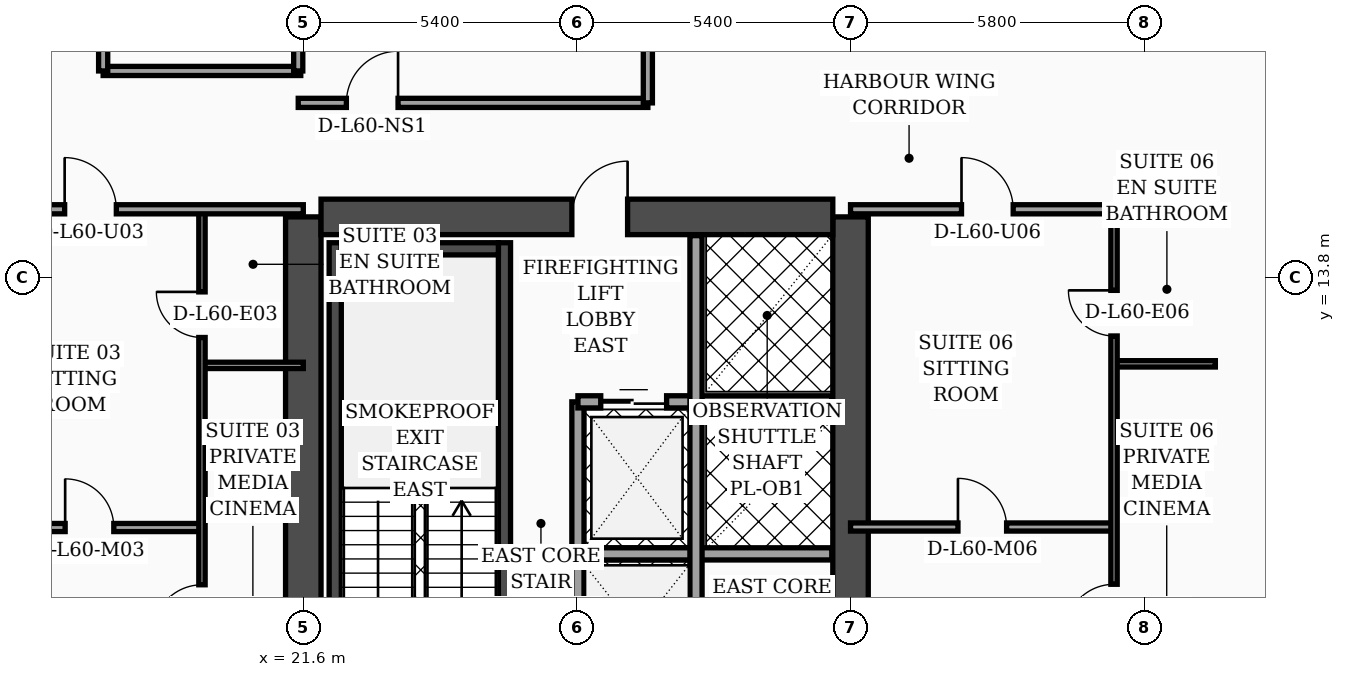
"""IFC4 building model, lengths in metres.
Left out: names, types, materials, properties, quantities, classifications, styles, units other than length and angle.
Written with IfcOpenShell. Run it as: python <this file> out.ifc"""

import sys

from ifc_helpers import new_model, si_unit, direction, frame, frame_2d, origin, place, context, subcontext, project, spatial, rectangle, extrude, element, fill, save


model = new_model("IFC4")
c1 = context("Model", 3, precision=1e-05, world=origin(), true_north=direction((0.0, 1.0)))
c2 = subcontext(c1, "Body", "Model", "MODEL_VIEW")
j1 = project(units=[si_unit("LENGTHUNIT", "METRE"), si_unit("PLANEANGLEUNIT", "RADIAN")], contexts=[c1])
p1 = place(None, origin())
s1 = spatial("IfcSite", under=j1, at=p1, CompositionType="ELEMENT")
p2 = place(p1, origin())
s2 = spatial("IfcBuilding", under=s1, at=p2, CompositionType="ELEMENT")
p3 = place(p2, frame((0.0, 0.0, 243.8)))
s3 = spatial("IfcBuildingStorey", under=s2, at=p3, CompositionType="ELEMENT", Elevation=243.8)
for number, where, z_axis, x_axis in (
    (1, (21.6, 4.6, 0.0), (0.0, 0.0, 1.0), (0.0, 1.0, 0.0)),
    (2, (32.4, 4.6, 0.0), (0.0, 0.0, 1.0), (0.0, 1.0, 0.0)),
):
    element("IfcWall", number, at=place(p3, frame(where, z_axis=z_axis, x_axis=x_axis)), inside=s3, PredefinedType="SHEAR", context=c2, shape_type="SweptSolid", body=[
        extrude(rectangle(XDim=10.4, YDim=0.7, at=frame_2d((5.2, 0.0))), origin(), (0.0, 0.0, 1.0), 3.56),
    ])
p4 = place(p3, frame((21.95, 15.0, 0.0), z_axis=(0.0, 0.0, 1.0), x_axis=(1.0, 0.0, 0.0)))
e3 = element("IfcWall", 3, at=p4, inside=s3, PredefinedType="SHEAR", context=c2, shape_type="SweptSolid", body=[
    extrude(rectangle(XDim=10.1, YDim=0.7, at=frame_2d((5.05, 0.0))), origin(), (0.0, 0.0, 1.0), 3.56),
])
p5 = place(p4, frame((4.95, 0.0, 0.0)))
e4 = element("IfcOpeningElement", 4, at=p5, cuts=e3, PredefinedType="OPENING", context=c2, shape_type="SweptSolid", body=[
    extrude(rectangle(XDim=1.1, YDim=2.2, at=frame_2d((0.55, 1.1))), frame((0.0, 0.36, 0.0), z_axis=(0.0, -1.0, 0.0), x_axis=(1.0, 0.0, 0.0)), (0.0, 0.0, 1.0), 0.72),
])
p6 = place(p3, frame((22.23, 4.95, 0.0), z_axis=(0.0, 0.0, 1.0), x_axis=(0.0, 1.0, 0.0)))
e5 = element("IfcWall", 5, at=p6, inside=s3, PredefinedType="SOLIDWALL", context=c2, shape_type="SweptSolid", body=[
    extrude(rectangle(XDim=9.54, YDim=0.24, at=frame_2d((4.77, 0.0))), origin(), (0.0, 0.0, 1.0), 3.56),
])
p7 = place(p3, frame((25.57, 4.95, 0.0), z_axis=(0.0, 0.0, 1.0), x_axis=(0.0, 1.0, 0.0)))
e6 = element("IfcWall", 6, at=p7, inside=s3, PredefinedType="SOLIDWALL", context=c2, shape_type="SweptSolid", body=[
    extrude(rectangle(XDim=9.54, YDim=0.24, at=frame_2d((4.77, 0.0))), origin(), (0.0, 0.0, 1.0), 3.56),
])
p8 = place(p7, frame((0.35, 0.0, 0.0)))
e7 = element("IfcOpeningElement", 7, at=p8, cuts=e6, PredefinedType="OPENING", context=c2, shape_type="SweptSolid", body=[
    extrude(rectangle(XDim=1.15, YDim=2.2, at=frame_2d((0.575, 1.1))), frame((0.0, 0.13, 0.0), z_axis=(0.0, -1.0, 0.0), x_axis=(1.0, 0.0, 0.0)), (0.0, 0.0, 1.0), 0.26),
])
p9 = place(p3, frame((22.35, 14.37, 0.0), z_axis=(0.0, 0.0, 1.0), x_axis=(1.0, 0.0, 0.0)))
e8 = element("IfcWall", 8, at=p9, inside=s3, PredefinedType="SOLIDWALL", context=c2, shape_type="SweptSolid", body=[
    extrude(rectangle(XDim=3.1, YDim=0.24, at=frame_2d((1.55, 0.0))), origin(), (0.0, 0.0, 1.0), 3.56),
])
p10 = place(p3, frame((46.63, 5.505, 0.0), z_axis=(0.0, 0.0, 1.0), x_axis=(-0.300501856448, 0.953781229775, 0.0)))
e9 = element("IfcWall", 9, at=p10, inside=s3, PredefinedType="SOLIDWALL", context=c2, shape_type="SweptSolid", body=[
    extrude(rectangle(XDim=30.814, YDim=0.32, at=frame_2d((15.407, 0.0))), origin(), (0.0, 0.0, 1.0), 3.56),
])
p11 = place(p10, frame((8.9, 0.0, 0.0)))
e10 = element("IfcOpeningElement", 10, at=p11, cuts=e9, PredefinedType="OPENING", context=c2, shape_type="SweptSolid", body=[
    extrude(rectangle(XDim=1.4, YDim=2.25, at=frame_2d((0.7, 1.125))), frame((0.0, 0.17, 0.0), z_axis=(0.0, -1.0, 0.0), x_axis=(1.0, 0.0, 0.0)), (0.0, 0.0, 1.0), 0.34),
])
p12 = place(p10, frame((4.437, 0.0, 0.7)))
e11 = element("IfcOpeningElement", 11, at=p12, cuts=e9, PredefinedType="OPENING", context=c2, shape_type="SweptSolid", body=[
    extrude(rectangle(XDim=1.6, YDim=1.65, at=frame_2d((0.8, 0.825))), frame((0.0, 0.17, 0.0), z_axis=(0.0, -1.0, 0.0), x_axis=(1.0, 0.0, 0.0)), (0.0, 0.0, 1.0), 0.34),
])
p13 = place(p10, frame((18.696, 0.0, 0.7)))
e12 = element("IfcOpeningElement", 12, at=p13, cuts=e9, PredefinedType="OPENING", context=c2, shape_type="SweptSolid", body=[
    extrude(rectangle(XDim=1.6, YDim=1.65, at=frame_2d((0.8, 0.825))), frame((0.0, 0.17, 0.0), z_axis=(0.0, -1.0, 0.0), x_axis=(1.0, 0.0, 0.0)), (0.0, 0.0, 1.0), 0.34),
])
p14 = place(p10, frame((1.6, 0.0, 0.75)))
e13 = element("IfcOpeningElement", 13, at=p14, cuts=e9, PredefinedType="OPENING", context=c2, shape_type="SweptSolid", body=[
    extrude(rectangle(XDim=1.5, YDim=1.6, at=frame_2d((0.75, 0.8))), frame((0.0, 0.17, 0.0), z_axis=(0.0, -1.0, 0.0), x_axis=(1.0, 0.0, 0.0)), (0.0, 0.0, 1.0), 0.34),
])
p15 = place(p10, frame((6.75, 0.0, 0.75)))
e14 = element("IfcOpeningElement", 14, at=p15, cuts=e9, PredefinedType="OPENING", context=c2, shape_type="SweptSolid", body=[
    extrude(rectangle(XDim=1.5, YDim=1.6, at=frame_2d((0.75, 0.8))), frame((0.0, 0.17, 0.0), z_axis=(0.0, -1.0, 0.0), x_axis=(1.0, 0.0, 0.0)), (0.0, 0.0, 1.0), 0.34),
])
p16 = place(p10, frame((10.9, 0.0, 0.75)))
e15 = element("IfcOpeningElement", 15, at=p16, cuts=e9, PredefinedType="OPENING", context=c2, shape_type="SweptSolid", body=[
    extrude(rectangle(XDim=1.5, YDim=1.6, at=frame_2d((0.75, 0.8))), frame((0.0, 0.17, 0.0), z_axis=(0.0, -1.0, 0.0), x_axis=(1.0, 0.0, 0.0)), (0.0, 0.0, 1.0), 0.34),
])
p17 = place(p10, frame((14.0, 0.0, 0.75)))
e16 = element("IfcOpeningElement", 16, at=p17, cuts=e9, PredefinedType="OPENING", context=c2, shape_type="SweptSolid", body=[
    extrude(rectangle(XDim=1.5, YDim=1.6, at=frame_2d((0.75, 0.8))), frame((0.0, 0.17, 0.0), z_axis=(0.0, -1.0, 0.0), x_axis=(1.0, 0.0, 0.0)), (0.0, 0.0, 1.0), 0.34),
])
p18 = place(p10, frame((16.55, 0.0, 0.75)))
e17 = element("IfcOpeningElement", 17, at=p18, cuts=e9, PredefinedType="OPENING", context=c2, shape_type="SweptSolid", body=[
    extrude(rectangle(XDim=1.5, YDim=1.6, at=frame_2d((0.75, 0.8))), frame((0.0, 0.17, 0.0), z_axis=(0.0, -1.0, 0.0), x_axis=(1.0, 0.0, 0.0)), (0.0, 0.0, 1.0), 0.34),
])
p19 = place(p10, frame((20.75, 0.0, 0.75)))
e18 = element("IfcOpeningElement", 18, at=p19, cuts=e9, PredefinedType="OPENING", context=c2, shape_type="SweptSolid", body=[
    extrude(rectangle(XDim=1.5, YDim=1.6, at=frame_2d((0.75, 0.8))), frame((0.0, 0.17, 0.0), z_axis=(0.0, -1.0, 0.0), x_axis=(1.0, 0.0, 0.0)), (0.0, 0.0, 1.0), 0.34),
])
p20 = place(p10, frame((23.3, 0.0, 0.75)))
e19 = element("IfcOpeningElement", 19, at=p20, cuts=e9, PredefinedType="OPENING", context=c2, shape_type="SweptSolid", body=[
    extrude(rectangle(XDim=1.5, YDim=1.6, at=frame_2d((0.75, 0.8))), frame((0.0, 0.17, 0.0), z_axis=(0.0, -1.0, 0.0), x_axis=(1.0, 0.0, 0.0)), (0.0, 0.0, 1.0), 0.34),
])
p21 = place(p10, frame((26.4, 0.0, 0.75)))
e20 = element("IfcOpeningElement", 20, at=p21, cuts=e9, PredefinedType="OPENING", context=c2, shape_type="SweptSolid", body=[
    extrude(rectangle(XDim=1.5, YDim=1.6, at=frame_2d((0.75, 0.8))), frame((0.0, 0.17, 0.0), z_axis=(0.0, -1.0, 0.0), x_axis=(1.0, 0.0, 0.0)), (0.0, 0.0, 1.0), 0.34),
])
p22 = place(p3, frame((27.02, 4.97, 0.0), z_axis=(0.0, 0.0, 1.0), x_axis=(0.0, 1.0, 0.0)))
e21 = element("IfcWall", 21, at=p22, inside=s3, PredefinedType="SOLIDWALL", context=c2, shape_type="SweptSolid", body=[
    extrude(rectangle(XDim=6.38, YDim=0.24, at=frame_2d((3.19, 0.0))), origin(), (0.0, 0.0, 1.0), 3.56),
])
p23 = place(p3, frame((27.02, 11.35, 0.0), z_axis=(0.0, 0.0, 1.0), x_axis=(1.0, 0.0, 0.0)))
e22 = element("IfcWall", 22, at=p23, inside=s3, PredefinedType="SOLIDWALL", context=c2, shape_type="SweptSolid", body=[
    extrude(rectangle(XDim=5.01, YDim=0.24, at=frame_2d((2.505, 0.0))), origin(), (0.0, 0.0, 1.0), 3.56),
])
p24 = place(p23, frame((0.45, 0.0, 0.0)))
e23 = element("IfcOpeningElement", 23, at=p24, cuts=e22, PredefinedType="OPENING", context=c2, shape_type="SweptSolid", body=[
    extrude(rectangle(XDim=1.3, YDim=2.35, at=frame_2d((0.65, 1.175))), frame((0.0, 0.13, 0.0), z_axis=(0.0, -1.0, 0.0), x_axis=(1.0, 0.0, 0.0)), (0.0, 0.0, 1.0), 0.26),
])
p25 = place(p3, frame((27.02, 8.35, 0.0), z_axis=(0.0, 0.0, 1.0), x_axis=(1.0, 0.0, 0.0)))
e24 = element("IfcWall", 24, at=p25, inside=s3, PredefinedType="SOLIDWALL", context=c2, shape_type="SweptSolid", body=[
    extrude(rectangle(XDim=5.01, YDim=0.24, at=frame_2d((2.505, 0.0))), origin(), (0.0, 0.0, 1.0), 3.56),
])
p26 = place(p3, frame((29.35, 4.97, 0.0), z_axis=(0.0, 0.0, 1.0), x_axis=(0.0, 1.0, 0.0)))
e25 = element("IfcWall", 25, at=p26, inside=s3, PredefinedType="SOLIDWALL", context=c2, shape_type="SweptSolid", body=[
    extrude(rectangle(XDim=9.66, YDim=0.24, at=frame_2d((4.83, 0.0))), origin(), (0.0, 0.0, 1.0), 3.56),
])
p27 = place(p26, frame((0.55, 0.0, 0.0)))
e26 = element("IfcOpeningElement", 26, at=p27, cuts=e25, PredefinedType="OPENING", context=c2, shape_type="SweptSolid", body=[
    extrude(rectangle(XDim=1.3, YDim=2.35, at=frame_2d((0.65, 1.175))), frame((0.0, 0.13, 0.0), z_axis=(0.0, -1.0, 0.0), x_axis=(1.0, 0.0, 0.0)), (0.0, 0.0, 1.0), 0.26),
])
p28 = place(p3, frame((19.6, 12.07, 0.0), z_axis=(0.0, 0.0, 1.0), x_axis=(1.0, 0.0, 0.0)))
e27 = element("IfcWall", 27, at=p28, inside=s3, PredefinedType="PARTITIONING", context=c2, shape_type="SweptSolid", body=[
    extrude(rectangle(XDim=2.0, YDim=0.125, at=frame_2d((1.0, 0.0))), origin(), (0.0, 0.0, 1.0), 3.56),
])
p29 = place(p3, frame((15.15, 8.87, 0.0), z_axis=(0.0, 0.0, 1.0), x_axis=(1.0, 0.0, 0.0)))
e28 = element("IfcWall", 28, at=p29, inside=s3, PredefinedType="PARTITIONING", context=c2, shape_type="SweptSolid", body=[
    extrude(rectangle(XDim=4.45, YDim=0.16, at=frame_2d((2.225, 0.0))), origin(), (0.0, 0.0, 1.0), 3.56),
])
p30 = place(p29, frame((1.75, 0.0, 0.0)))
e29 = element("IfcOpeningElement", 29, at=p30, cuts=e28, PredefinedType="OPENING", context=c2, shape_type="SweptSolid", body=[
    extrude(rectangle(XDim=0.96, YDim=2.2, at=frame_2d((0.48, 1.1))), frame((0.0, 0.09, 0.0), z_axis=(0.0, -1.0, 0.0), x_axis=(1.0, 0.0, 0.0)), (0.0, 0.0, 1.0), 0.18),
])
p31 = place(p3, frame((19.6, 2.44, 0.0), z_axis=(0.0, 0.0, 1.0), x_axis=(0.0, 1.0, 0.0)))
e30 = element("IfcWall", 30, at=p31, inside=s3, PredefinedType="PARTITIONING", context=c2, shape_type="SweptSolid", body=[
    extrude(rectangle(XDim=12.71, YDim=0.125, at=frame_2d((6.355, 0.0))), origin(), (0.0, 0.0, 1.0), 2.59),
])
p32 = place(p31, frame((4.34, 0.0, 0.0)))
e31 = element("IfcOpeningElement", 31, at=p32, cuts=e30, PredefinedType="OPENING", context=c2, shape_type="SweptSolid", body=[
    extrude(rectangle(XDim=0.96, YDim=2.2, at=frame_2d((0.48, 1.1))), frame((0.0, 0.073, 0.0), z_axis=(0.0, -1.0, 0.0), x_axis=(1.0, 0.0, 0.0)), (0.0, 0.0, 1.0), 0.145),
])
p33 = place(p31, frame((10.18, 0.0, 0.0)))
e32 = element("IfcOpeningElement", 32, at=p33, cuts=e30, PredefinedType="OPENING", context=c2, shape_type="SweptSolid", body=[
    extrude(rectangle(XDim=0.9, YDim=2.15, at=frame_2d((0.45, 1.075))), frame((0.0, 0.073, 0.0), z_axis=(0.0, -1.0, 0.0), x_axis=(1.0, 0.0, 0.0)), (0.0, 0.0, 1.0), 0.145),
])
p34 = place(p3, frame((15.15, 15.15, 0.0), z_axis=(0.0, 0.0, 1.0), x_axis=(1.0, 0.0, 0.0)))
e33 = element("IfcWall", 33, at=p34, inside=s3, PredefinedType="PARTITIONING", context=c2, shape_type="SweptSolid", body=[
    extrude(rectangle(XDim=6.45, YDim=0.18, at=frame_2d((3.225, 0.0))), origin(), (0.0, 0.0, 1.0), 2.59),
])
p35 = place(p34, frame((1.74, 0.0, 0.0)))
e34 = element("IfcOpeningElement", 34, at=p35, cuts=e33, PredefinedType="OPENING", context=c2, shape_type="SweptSolid", body=[
    extrude(rectangle(XDim=1.02, YDim=2.2, at=frame_2d((0.51, 1.1))), frame((0.0, 0.1, 0.0), z_axis=(0.0, -1.0, 0.0), x_axis=(1.0, 0.0, 0.0)), (0.0, 0.0, 1.0), 0.2),
])
p36 = place(p3, frame((17.65, 17.88, 0.0), z_axis=(0.0, 0.0, 1.0), x_axis=(1.0, 0.0, 0.0)))
e35 = element("IfcWall", 35, at=p36, inside=s3, PredefinedType="PARTITIONING", context=c2, shape_type="SweptSolid", body=[
    extrude(rectangle(XDim=3.9, YDim=0.18, at=frame_2d((1.95, 0.0))), origin(), (0.0, 0.0, 1.0), 3.09),
])
p37 = place(p3, frame((21.5, 17.88, 0.0), z_axis=(0.0, 0.0, 1.0), x_axis=(0.0, 1.0, 0.0)))
e36 = element("IfcWall", 36, at=p37, inside=s3, PredefinedType="PARTITIONING", context=c2, shape_type="SweptSolid", body=[
    extrude(rectangle(XDim=6.44, YDim=0.18, at=frame_2d((3.22, 0.0))), origin(), (0.0, 0.0, 1.0), 3.09),
])
p38 = place(p3, frame((17.65, 17.88, 0.0), z_axis=(0.0, 0.0, 1.0), x_axis=(0.0, 1.0, 0.0)))
e37 = element("IfcWall", 37, at=p38, inside=s3, PredefinedType="PARTITIONING", context=c2, shape_type="SweptSolid", body=[
    extrude(rectangle(XDim=6.44, YDim=0.18, at=frame_2d((3.22, 0.0))), origin(), (0.0, 0.0, 1.0), 3.09),
])
p39 = place(p38, frame((0.65, 0.0, 0.0)))
e38 = element("IfcOpeningElement", 38, at=p39, cuts=e37, PredefinedType="OPENING", context=c2, shape_type="SweptSolid", body=[
    extrude(rectangle(XDim=0.98, YDim=2.15, at=frame_2d((0.49, 1.075))), frame((0.0, 0.1, 0.0), z_axis=(0.0, -1.0, 0.0), x_axis=(1.0, 0.0, 0.0)), (0.0, 0.0, 1.0), 0.2),
])
p40 = place(p38, frame((3.97, 0.0, 0.0)))
e39 = element("IfcOpeningElement", 39, at=p40, cuts=e37, PredefinedType="OPENING", context=c2, shape_type="SweptSolid", body=[
    extrude(rectangle(XDim=0.96, YDim=2.2, at=frame_2d((0.48, 1.1))), frame((0.0, 0.1, 0.0), z_axis=(0.0, -1.0, 0.0), x_axis=(1.0, 0.0, 0.0)), (0.0, 0.0, 1.0), 0.2),
])
p41 = place(p3, frame((37.6, 12.1, 0.0), z_axis=(0.0, 0.0, 1.0), x_axis=(1.0, 0.0, 0.0)))
e40 = element("IfcWall", 40, at=p41, inside=s3, PredefinedType="PARTITIONING", context=c2, shape_type="SweptSolid", body=[
    extrude(rectangle(XDim=2.0, YDim=0.125, at=frame_2d((1.0, 0.0))), origin(), (0.0, 0.0, 1.0), 3.56),
])
p42 = place(p3, frame((32.4, 8.88, 0.0), z_axis=(0.0, 0.0, 1.0), x_axis=(1.0, 0.0, 0.0)))
e41 = element("IfcWall", 41, at=p42, inside=s3, PredefinedType="PARTITIONING", context=c2, shape_type="SweptSolid", body=[
    extrude(rectangle(XDim=5.2, YDim=0.16, at=frame_2d((2.6, 0.0))), origin(), (0.0, 0.0, 1.0), 2.99),
])
p43 = place(p42, frame((2.12, 0.0, 0.0)))
e42 = element("IfcOpeningElement", 42, at=p43, cuts=e41, PredefinedType="OPENING", context=c2, shape_type="SweptSolid", body=[
    extrude(rectangle(XDim=0.96, YDim=2.2, at=frame_2d((0.48, 1.1))), frame((0.0, 0.09, 0.0), z_axis=(0.0, -1.0, 0.0), x_axis=(1.0, 0.0, 0.0)), (0.0, 0.0, 1.0), 0.18),
])
p44 = place(p3, frame((37.6, 2.44, 0.0), z_axis=(0.0, 0.0, 1.0), x_axis=(0.0, 1.0, 0.0)))
e43 = element("IfcWall", 43, at=p44, inside=s3, PredefinedType="PARTITIONING", context=c2, shape_type="SweptSolid", body=[
    extrude(rectangle(XDim=12.71, YDim=0.125, at=frame_2d((6.355, 0.0))), origin(), (0.0, 0.0, 1.0), 2.99),
])
p45 = place(p44, frame((4.35, 0.0, 0.0)))
e44 = element("IfcOpeningElement", 44, at=p45, cuts=e43, PredefinedType="OPENING", context=c2, shape_type="SweptSolid", body=[
    extrude(rectangle(XDim=0.96, YDim=2.2, at=frame_2d((0.48, 1.1))), frame((0.0, 0.073, 0.0), z_axis=(0.0, -1.0, 0.0), x_axis=(1.0, 0.0, 0.0)), (0.0, 0.0, 1.0), 0.145),
])
p46 = place(p44, frame((10.21, 0.0, 0.0)))
e45 = element("IfcOpeningElement", 45, at=p46, cuts=e43, PredefinedType="OPENING", context=c2, shape_type="SweptSolid", body=[
    extrude(rectangle(XDim=0.9, YDim=2.15, at=frame_2d((0.45, 1.075))), frame((0.0, 0.073, 0.0), z_axis=(0.0, -1.0, 0.0), x_axis=(1.0, 0.0, 0.0)), (0.0, 0.0, 1.0), 0.145),
])
p47 = place(p3, frame((32.4, 15.15, 0.0), z_axis=(0.0, 0.0, 1.0), x_axis=(1.0, 0.0, 0.0)))
e46 = element("IfcWall", 46, at=p47, inside=s3, PredefinedType="PARTITIONING", context=c2, shape_type="SweptSolid", body=[
    extrude(rectangle(XDim=7.2, YDim=0.18, at=frame_2d((3.6, 0.0))), origin(), (0.0, 0.0, 1.0), 2.99),
])
p48 = place(p47, frame((2.19, 0.0, 0.0)))
e47 = element("IfcOpeningElement", 47, at=p48, cuts=e46, PredefinedType="OPENING", context=c2, shape_type="SweptSolid", body=[
    extrude(rectangle(XDim=1.02, YDim=2.2, at=frame_2d((0.51, 1.1))), frame((0.0, 0.1, 0.0), z_axis=(0.0, -1.0, 0.0), x_axis=(1.0, 0.0, 0.0)), (0.0, 0.0, 1.0), 0.2),
])
p49 = place(p3, frame((21.5, 17.25, 0.0), z_axis=(0.0, 0.0, 1.0), x_axis=(1.0, 0.0, 0.0)))
e48 = element("IfcWall", 48, at=p49, inside=s3, PredefinedType="PARTITIONING", context=c2, shape_type="SweptSolid", body=[
    extrude(rectangle(XDim=6.9, YDim=0.18, at=frame_2d((3.45, 0.0))), origin(), (0.0, 0.0, 1.0), 2.99),
])
p50 = place(p49, frame((0.95, 0.0, 0.0)))
e49 = element("IfcOpeningElement", 49, at=p50, cuts=e48, PredefinedType="OPENING", context=c2, shape_type="SweptSolid", body=[
    extrude(rectangle(XDim=1.02, YDim=2.2, at=frame_2d((0.51, 1.1))), frame((0.0, 0.1, 0.0), z_axis=(0.0, -1.0, 0.0), x_axis=(1.0, 0.0, 0.0)), (0.0, 0.0, 1.0), 0.2),
])
p51 = place(p3, frame((28.4, 17.25, 0.0), z_axis=(0.0, 0.0, 1.0), x_axis=(0.0, 1.0, 0.0)))
e50 = element("IfcWall", 50, at=p51, inside=s3, PredefinedType="PARTITIONING", context=c2, shape_type="SweptSolid", body=[
    extrude(rectangle(XDim=15.07, YDim=0.18, at=frame_2d((7.535, 0.0))), origin(), (0.0, 0.0, 1.0), 2.99),
])
p52 = place(p24, origin())
e51 = element("IfcDoor", 51, at=p52, inside=s3, OperationType="DOUBLE_DOOR_SLIDING", PredefinedType="DOOR", context=c2, shape_type="SweptSolid", body=[
    extrude(rectangle(XDim=1.3, YDim=2.35, at=frame_2d((0.65, 1.175))), frame((0.0, 0.025, 0.0), z_axis=(0.0, -1.0, 0.0), x_axis=(1.0, 0.0, 0.0)), (0.0, 0.0, 1.0), 0.05),
])
fill(e23, e51)
p53 = place(p30, origin())
e52 = element("IfcDoor", 52, at=p53, inside=s3, OperationType="SINGLE_SWING_LEFT", PredefinedType="DOOR", context=c2, shape_type="SweptSolid", body=[
    extrude(rectangle(XDim=0.96, YDim=2.2, at=frame_2d((0.48, 1.1))), frame((0.0, 0.025, 0.0), z_axis=(0.0, -1.0, 0.0), x_axis=(1.0, 0.0, 0.0)), (0.0, 0.0, 1.0), 0.05),
])
fill(e29, e52)
p54 = place(p32, origin())
e53 = element("IfcDoor", 53, at=p54, inside=s3, OperationType="SINGLE_SWING_LEFT", PredefinedType="DOOR", context=c2, shape_type="SweptSolid", body=[
    extrude(rectangle(XDim=0.96, YDim=2.2, at=frame_2d((0.48, 1.1))), frame((0.0, 0.025, 0.0), z_axis=(0.0, -1.0, 0.0), x_axis=(1.0, 0.0, 0.0)), (0.0, 0.0, 1.0), 0.05),
])
fill(e31, e53)
p55 = place(p33, origin())
e54 = element("IfcDoor", 54, at=p55, inside=s3, OperationType="SINGLE_SWING_RIGHT", PredefinedType="DOOR", context=c2, shape_type="SweptSolid", body=[
    extrude(rectangle(XDim=0.9, YDim=2.15, at=frame_2d((0.45, 1.075))), frame((0.0, 0.025, 0.0), z_axis=(0.0, -1.0, 0.0), x_axis=(1.0, 0.0, 0.0)), (0.0, 0.0, 1.0), 0.05),
])
fill(e32, e54)
p56 = place(p35, origin())
e55 = element("IfcDoor", 55, at=p56, inside=s3, OperationType="SINGLE_SWING_LEFT", PredefinedType="DOOR", context=c2, shape_type="SweptSolid", body=[
    extrude(rectangle(XDim=1.02, YDim=2.2, at=frame_2d((0.51, 1.1))), frame((0.0, 0.025, 0.0), z_axis=(0.0, -1.0, 0.0), x_axis=(1.0, 0.0, 0.0)), (0.0, 0.0, 1.0), 0.05),
])
fill(e34, e55)
p57 = place(p43, origin())
e56 = element("IfcDoor", 56, at=p57, inside=s3, OperationType="SINGLE_SWING_LEFT", PredefinedType="DOOR", context=c2, shape_type="SweptSolid", body=[
    extrude(rectangle(XDim=0.96, YDim=2.2, at=frame_2d((0.48, 1.1))), frame((0.0, 0.025, 0.0), z_axis=(0.0, -1.0, 0.0), x_axis=(1.0, 0.0, 0.0)), (0.0, 0.0, 1.0), 0.05),
])
fill(e42, e56)
p58 = place(p45, origin())
e57 = element("IfcDoor", 57, at=p58, inside=s3, OperationType="SINGLE_SWING_LEFT", PredefinedType="DOOR", context=c2, shape_type="SweptSolid", body=[
    extrude(rectangle(XDim=0.96, YDim=2.2, at=frame_2d((0.48, 1.1))), frame((0.0, 0.025, 0.0), z_axis=(0.0, -1.0, 0.0), x_axis=(1.0, 0.0, 0.0)), (0.0, 0.0, 1.0), 0.05),
])
fill(e44, e57)
p59 = place(p46, origin())
e58 = element("IfcDoor", 58, at=p59, inside=s3, OperationType="SINGLE_SWING_RIGHT", PredefinedType="DOOR", context=c2, shape_type="SweptSolid", body=[
    extrude(rectangle(XDim=0.9, YDim=2.15, at=frame_2d((0.45, 1.075))), frame((0.0, 0.025, 0.0), z_axis=(0.0, -1.0, 0.0), x_axis=(1.0, 0.0, 0.0)), (0.0, 0.0, 1.0), 0.05),
])
fill(e45, e58)
p60 = place(p48, origin())
e59 = element("IfcDoor", 59, at=p60, inside=s3, OperationType="SINGLE_SWING_LEFT", PredefinedType="DOOR", context=c2, shape_type="SweptSolid", body=[
    extrude(rectangle(XDim=1.02, YDim=2.2, at=frame_2d((0.51, 1.1))), frame((0.0, 0.025, 0.0), z_axis=(0.0, -1.0, 0.0), x_axis=(1.0, 0.0, 0.0)), (0.0, 0.0, 1.0), 0.05),
])
fill(e47, e59)
p61 = place(p50, origin())
e60 = element("IfcDoor", 60, at=p61, inside=s3, OperationType="SINGLE_SWING_RIGHT", PredefinedType="DOOR", context=c2, shape_type="SweptSolid", body=[
    extrude(rectangle(XDim=1.02, YDim=2.2, at=frame_2d((0.51, 1.1))), frame((0.0, 0.025, 0.0), z_axis=(0.0, -1.0, 0.0), x_axis=(1.0, 0.0, 0.0)), (0.0, 0.0, 1.0), 0.05),
])
fill(e49, e60)
p62 = place(p5, origin())
e61 = element("IfcDoor", 61, at=p62, inside=s3, OperationType="SINGLE_SWING_RIGHT", PredefinedType="DOOR", context=c2, shape_type="SweptSolid", body=[
    extrude(rectangle(XDim=1.1, YDim=2.2, at=frame_2d((0.55, 1.1))), frame((0.0, 0.025, 0.0), z_axis=(0.0, -1.0, 0.0), x_axis=(1.0, 0.0, 0.0)), (0.0, 0.0, 1.0), 0.05),
])
fill(e4, e61)
save(model, sys.argv[1])
